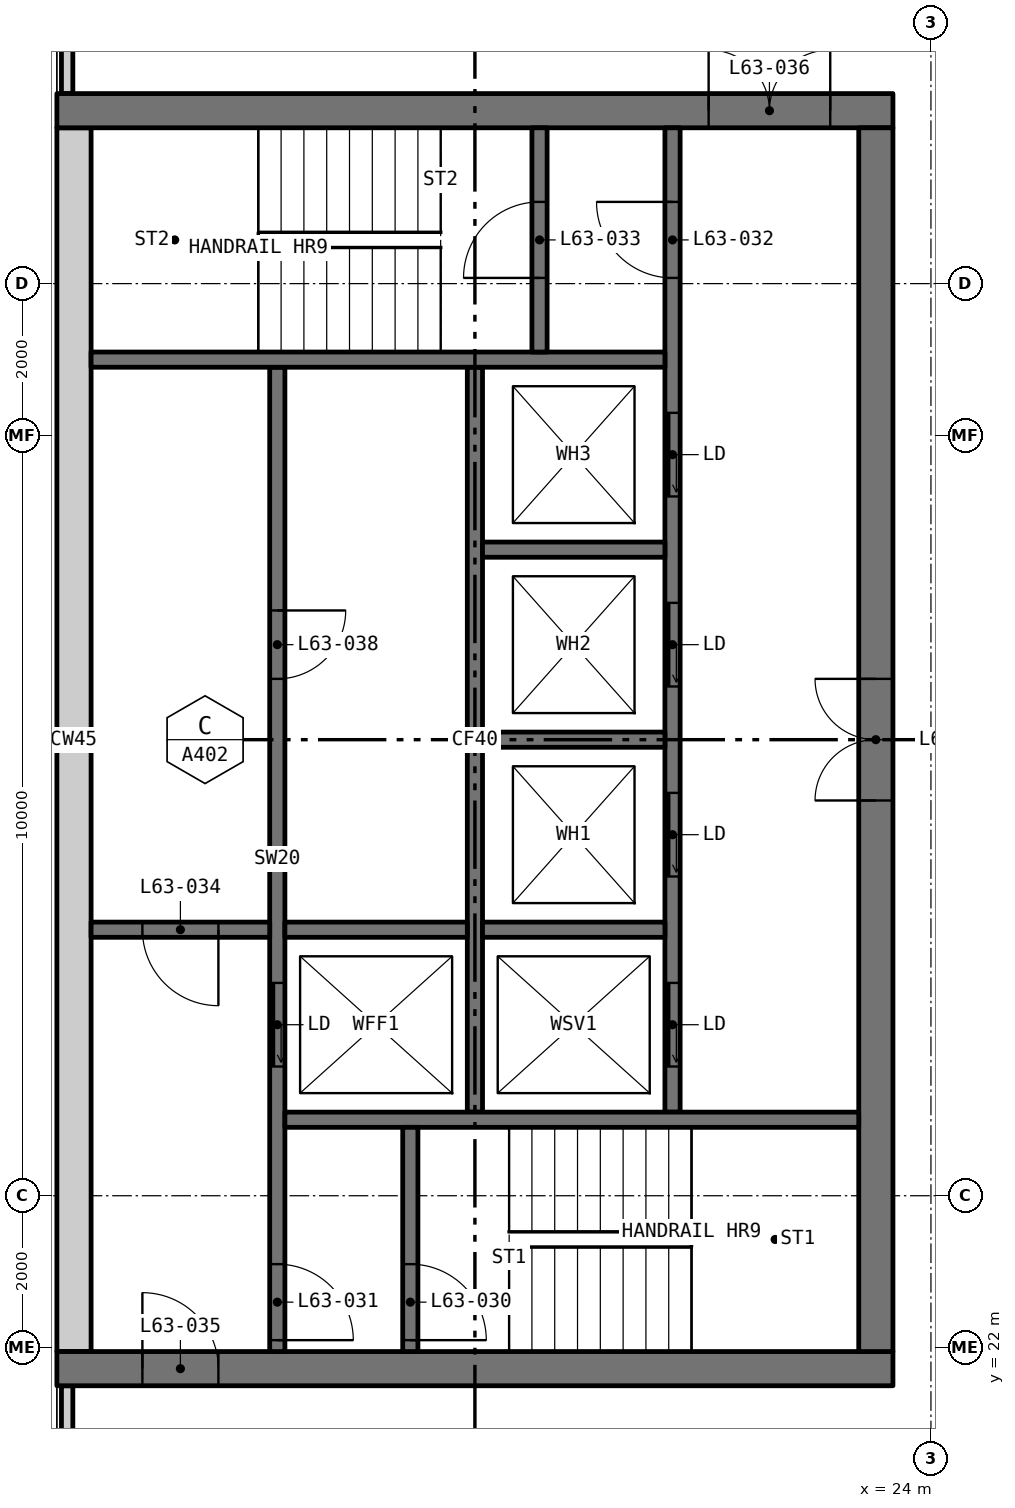
"""IFC4 building model, lengths in metres.
Left out: names, types, materials, properties, quantities, classifications, styles, units other than length and angle.
Written with IfcOpenShell. Run it as: python <this file> out.ifc"""

import sys

from ifc_helpers import new_model, si_unit, direction, frame, frame_2d, origin, place, context, subcontext, project, spatial, rectangle, extrude, element, fill, save


model = new_model("IFC4")
c1 = context("Model", 3, precision=1e-05, world=origin(), true_north=direction((0.0, 1.0)))
c2 = subcontext(c1, "Body", "Model", "MODEL_VIEW")
j1 = project(units=[si_unit("LENGTHUNIT", "METRE"), si_unit("PLANEANGLEUNIT", "RADIAN")], contexts=[c1])
p1 = place(None, origin())
s1 = spatial("IfcSite", under=j1, at=p1, CompositionType="ELEMENT")
p2 = place(p1, origin())
s2 = spatial("IfcBuilding", under=s1, at=p2, CompositionType="ELEMENT")
p3 = place(p2, frame((0.0, 0.0, 235.2)))
s3 = spatial("IfcBuildingStorey", under=s2, at=p3, CompositionType="ELEMENT", Elevation=235.2)
for number, where, z_axis, x_axis in (
    (1, (12.635, 18.71, 0.0), (0.0, 0.0, 1.0), (0.0, 1.0, 0.0)),
    (2, (12.635, 38.5, 0.0), (0.0, 0.0, 1.0), (0.0, 1.0, 0.0)),
):
    element("IfcWall", number, at=place(p3, frame(where, z_axis=z_axis, x_axis=x_axis)), inside=s3, PredefinedType="ELEMENTEDWALL", context=c2, shape_type="SweptSolid", body=[
        extrude(rectangle(XDim=2.79, YDim=0.15, at=frame_2d((1.395, 0.0))), origin(), (0.0, 0.0, 1.0), 3.05),
    ])
p4 = place(p3, frame((12.5, 21.725, 0.0), z_axis=(0.0, 0.0, 1.0), x_axis=(1.0, 0.0, 0.0)))
e3 = element("IfcWall", 3, at=p4, inside=s3, PredefinedType="SHEAR", context=c2, shape_type="SweptSolid", body=[
    extrude(rectangle(XDim=11.0, YDim=0.45, at=frame_2d((5.5, 0.0))), origin(), (0.0, 0.0, 1.0), 3.05),
])
p5 = place(p4, frame((1.125, 0.0, 0.0)))
e4 = element("IfcOpeningElement", 4, at=p5, cuts=e3, PredefinedType="OPENING", context=c2, shape_type="SweptSolid", body=[
    extrude(rectangle(XDim=1.0, YDim=2.1, at=frame_2d((0.5, 1.05))), frame((0.0, 0.235, 0.0), z_axis=(0.0, -1.0, 0.0), x_axis=(1.0, 0.0, 0.0)), (0.0, 0.0, 1.0), 0.47),
])
p6 = place(p3, frame((12.5, 38.275, 0.0), z_axis=(0.0, 0.0, 1.0), x_axis=(1.0, 0.0, 0.0)))
e5 = element("IfcWall", 5, at=p6, inside=s3, PredefinedType="SHEAR", context=c2, shape_type="SweptSolid", body=[
    extrude(rectangle(XDim=11.0, YDim=0.45, at=frame_2d((5.5, 0.0))), origin(), (0.0, 0.0, 1.0), 3.05),
])
p7 = place(p6, frame((8.575, 0.0, 0.0)))
e6 = element("IfcOpeningElement", 6, at=p7, cuts=e5, PredefinedType="OPENING", context=c2, shape_type="SweptSolid", body=[
    extrude(rectangle(XDim=1.6, YDim=2.1, at=frame_2d((0.8, 1.05))), frame((0.0, 0.235, 0.0), z_axis=(0.0, -1.0, 0.0), x_axis=(1.0, 0.0, 0.0)), (0.0, 0.0, 1.0), 0.47),
])
p8 = place(p3, frame((12.725, 21.95, 0.0), z_axis=(0.0, 0.0, 1.0), x_axis=(0.0, 1.0, 0.0)))
e7 = element("IfcWall", 7, at=p8, inside=s3, PredefinedType="SHEAR", context=c2, shape_type="SweptSolid", body=[
    extrude(rectangle(XDim=16.1, YDim=0.45, at=frame_2d((8.05, 0.0))), origin(), (0.0, 0.0, 1.0), 3.05),
])
p9 = place(p3, frame((23.275, 21.95, 0.0), z_axis=(0.0, 0.0, 1.0), x_axis=(0.0, 1.0, 0.0)))
e8 = element("IfcWall", 8, at=p9, inside=s3, PredefinedType="SHEAR", context=c2, shape_type="SweptSolid", body=[
    extrude(rectangle(XDim=16.1, YDim=0.45, at=frame_2d((8.05, 0.0))), origin(), (0.0, 0.0, 1.0), 3.05),
])
p10 = place(p9, frame((7.25, 0.0, 0.0)))
e9 = element("IfcOpeningElement", 9, at=p10, cuts=e8, PredefinedType="OPENING", context=c2, shape_type="SweptSolid", body=[
    extrude(rectangle(XDim=1.6, YDim=2.1, at=frame_2d((0.8, 1.05))), frame((0.0, 0.235, 0.0), z_axis=(0.0, -1.0, 0.0), x_axis=(1.0, 0.0, 0.0)), (0.0, 0.0, 1.0), 0.47),
])
p11 = place(p3, frame((15.4, 21.95, 0.0), z_axis=(0.0, 0.0, 1.0), x_axis=(0.0, 1.0, 0.0)))
e10 = element("IfcWall", 10, at=p11, inside=s3, PredefinedType="SOLIDWALL", context=c2, shape_type="SweptSolid", body=[
    extrude(rectangle(XDim=12.95, YDim=0.2, at=frame_2d((6.475, 0.0))), origin(), (0.0, 0.0, 1.0), 3.05),
])
p12 = place(p11, frame((3.75, 0.0, 0.0)))
e11 = element("IfcOpeningElement", 11, at=p12, cuts=e10, PredefinedType="OPENING", context=c2, shape_type="SweptSolid", body=[
    extrude(rectangle(XDim=1.1, YDim=2.1, at=frame_2d((0.55, 1.05))), frame((0.0, 0.11, 0.0), z_axis=(0.0, -1.0, 0.0), x_axis=(1.0, 0.0, 0.0)), (0.0, 0.0, 1.0), 0.22),
])
p13 = place(p11, frame((0.15, 0.0, 0.0)))
e12 = element("IfcOpeningElement", 12, at=p13, cuts=e10, PredefinedType="OPENING", context=c2, shape_type="SweptSolid", body=[
    extrude(rectangle(XDim=1.0, YDim=2.1, at=frame_2d((0.5, 1.05))), frame((0.0, 0.11, 0.0), z_axis=(0.0, -1.0, 0.0), x_axis=(1.0, 0.0, 0.0)), (0.0, 0.0, 1.0), 0.22),
])
p14 = place(p11, frame((8.85, 0.0, 0.0)))
e13 = element("IfcOpeningElement", 13, at=p14, cuts=e10, PredefinedType="OPENING", context=c2, shape_type="SweptSolid", body=[
    extrude(rectangle(XDim=0.9, YDim=2.1, at=frame_2d((0.45, 1.05))), frame((0.0, 0.11, 0.0), z_axis=(0.0, -1.0, 0.0), x_axis=(1.0, 0.0, 0.0)), (0.0, 0.0, 1.0), 0.22),
])
p15 = place(p3, frame((20.6, 25.1, 0.0), z_axis=(0.0, 0.0, 1.0), x_axis=(0.0, 1.0, 0.0)))
e14 = element("IfcWall", 14, at=p15, inside=s3, PredefinedType="SOLIDWALL", context=c2, shape_type="SweptSolid", body=[
    extrude(rectangle(XDim=12.95, YDim=0.2, at=frame_2d((6.475, 0.0))), origin(), (0.0, 0.0, 1.0), 3.05),
])
p16 = place(p15, frame((0.6, 0.0, 0.0)))
e15 = element("IfcOpeningElement", 15, at=p16, cuts=e14, PredefinedType="OPENING", context=c2, shape_type="SweptSolid", body=[
    extrude(rectangle(XDim=1.1, YDim=2.1, at=frame_2d((0.55, 1.05))), frame((0.0, 0.11, 0.0), z_axis=(0.0, -1.0, 0.0), x_axis=(1.0, 0.0, 0.0)), (0.0, 0.0, 1.0), 0.22),
])
p17 = place(p15, frame((3.1, 0.0, 0.0)))
e16 = element("IfcOpeningElement", 16, at=p17, cuts=e14, PredefinedType="OPENING", context=c2, shape_type="SweptSolid", body=[
    extrude(rectangle(XDim=1.1, YDim=2.1, at=frame_2d((0.55, 1.05))), frame((0.0, 0.11, 0.0), z_axis=(0.0, -1.0, 0.0), x_axis=(1.0, 0.0, 0.0)), (0.0, 0.0, 1.0), 0.22),
])
p18 = place(p15, frame((5.6, 0.0, 0.0)))
e17 = element("IfcOpeningElement", 17, at=p18, cuts=e14, PredefinedType="OPENING", context=c2, shape_type="SweptSolid", body=[
    extrude(rectangle(XDim=1.1, YDim=2.1, at=frame_2d((0.55, 1.05))), frame((0.0, 0.11, 0.0), z_axis=(0.0, -1.0, 0.0), x_axis=(1.0, 0.0, 0.0)), (0.0, 0.0, 1.0), 0.22),
])
p19 = place(p15, frame((8.1, 0.0, 0.0)))
e18 = element("IfcOpeningElement", 18, at=p19, cuts=e14, PredefinedType="OPENING", context=c2, shape_type="SweptSolid", body=[
    extrude(rectangle(XDim=1.1, YDim=2.1, at=frame_2d((0.55, 1.05))), frame((0.0, 0.11, 0.0), z_axis=(0.0, -1.0, 0.0), x_axis=(1.0, 0.0, 0.0)), (0.0, 0.0, 1.0), 0.22),
])
p20 = place(p15, frame((10.975, 0.0, 0.0)))
e19 = element("IfcOpeningElement", 19, at=p20, cuts=e14, PredefinedType="OPENING", context=c2, shape_type="SweptSolid", body=[
    extrude(rectangle(XDim=1.0, YDim=2.1, at=frame_2d((0.5, 1.05))), frame((0.0, 0.11, 0.0), z_axis=(0.0, -1.0, 0.0), x_axis=(1.0, 0.0, 0.0)), (0.0, 0.0, 1.0), 0.22),
])
p21 = place(p3, frame((18.0, 25.1, 0.0), z_axis=(0.0, 0.0, 1.0), x_axis=(0.0, 1.0, 0.0)))
e20 = element("IfcWall", 20, at=p21, inside=s3, PredefinedType="SOLIDWALL", context=c2, shape_type="SweptSolid", body=[
    extrude(rectangle(XDim=9.8, YDim=0.2, at=frame_2d((4.9, 0.0))), origin(), (0.0, 0.0, 1.0), 3.05),
])
for number, where, z_axis, x_axis in (
    (21, (15.5, 25.0, 0.0), (0.0, 0.0, 1.0), (1.0, 0.0, 0.0)),
    (22, (12.95, 35.0, 0.0), (0.0, 0.0, 1.0), (1.0, 0.0, 0.0)),
):
    element("IfcWall", number, at=place(p3, frame(where, z_axis=z_axis, x_axis=x_axis)), inside=s3, PredefinedType="SOLIDWALL", context=c2, shape_type="SweptSolid", body=[
        extrude(rectangle(XDim=7.55, YDim=0.2, at=frame_2d((3.775, 0.0))), origin(), (0.0, 0.0, 1.0), 3.05),
    ])
p22 = place(p3, frame((12.95, 27.5, 0.0), z_axis=(0.0, 0.0, 1.0), x_axis=(1.0, 0.0, 0.0)))
e23 = element("IfcWall", 23, at=p22, inside=s3, PredefinedType="SOLIDWALL", context=c2, shape_type="SweptSolid", body=[
    extrude(rectangle(XDim=2.35, YDim=0.2, at=frame_2d((1.175, 0.0))), origin(), (0.0, 0.0, 1.0), 3.05),
])
p23 = place(p22, frame((0.675, 0.0, 0.0)))
e24 = element("IfcOpeningElement", 24, at=p23, cuts=e23, PredefinedType="OPENING", context=c2, shape_type="SweptSolid", body=[
    extrude(rectangle(XDim=1.0, YDim=2.1, at=frame_2d((0.5, 1.05))), frame((0.0, 0.11, 0.0), z_axis=(0.0, -1.0, 0.0), x_axis=(1.0, 0.0, 0.0)), (0.0, 0.0, 1.0), 0.22),
])
p24 = place(p3, frame((17.15, 21.95, 0.0), z_axis=(0.0, 0.0, 1.0), x_axis=(0.0, 1.0, 0.0)))
e25 = element("IfcWall", 25, at=p24, inside=s3, PredefinedType="SOLIDWALL", context=c2, shape_type="SweptSolid", body=[
    extrude(rectangle(XDim=2.95, YDim=0.2, at=frame_2d((1.475, 0.0))), origin(), (0.0, 0.0, 1.0), 3.05),
])
p25 = place(p24, frame((0.15, 0.0, 0.0)))
e26 = element("IfcOpeningElement", 26, at=p25, cuts=e25, PredefinedType="OPENING", context=c2, shape_type="SweptSolid", body=[
    extrude(rectangle(XDim=1.0, YDim=2.1, at=frame_2d((0.5, 1.05))), frame((0.0, 0.11, 0.0), z_axis=(0.0, -1.0, 0.0), x_axis=(1.0, 0.0, 0.0)), (0.0, 0.0, 1.0), 0.22),
])
p26 = place(p3, frame((18.85, 35.1, 0.0), z_axis=(0.0, 0.0, 1.0), x_axis=(0.0, 1.0, 0.0)))
e27 = element("IfcWall", 27, at=p26, inside=s3, PredefinedType="SOLIDWALL", context=c2, shape_type="SweptSolid", body=[
    extrude(rectangle(XDim=2.95, YDim=0.2, at=frame_2d((1.475, 0.0))), origin(), (0.0, 0.0, 1.0), 3.05),
])
p27 = place(p26, frame((0.975, 0.0, 0.0)))
e28 = element("IfcOpeningElement", 28, at=p27, cuts=e27, PredefinedType="OPENING", context=c2, shape_type="SweptSolid", body=[
    extrude(rectangle(XDim=1.0, YDim=2.1, at=frame_2d((0.5, 1.05))), frame((0.0, 0.11, 0.0), z_axis=(0.0, -1.0, 0.0), x_axis=(1.0, 0.0, 0.0)), (0.0, 0.0, 1.0), 0.22),
])
for number, where, z_axis, x_axis in (
    (29, (15.5, 27.5, 0.0), (0.0, 0.0, 1.0), (1.0, 0.0, 0.0)),
    (30, (18.1, 27.5, 0.0), (0.0, 0.0, 1.0), (1.0, 0.0, 0.0)),
    (31, (18.1, 30.0, 0.0), (0.0, 0.0, 1.0), (1.0, 0.0, 0.0)),
    (32, (18.1, 32.5, 0.0), (0.0, 0.0, 1.0), (1.0, 0.0, 0.0)),
):
    element("IfcWall", number, at=place(p3, frame(where, z_axis=z_axis, x_axis=x_axis)), inside=s3, PredefinedType="SOLIDWALL", context=c2, shape_type="SweptSolid", body=[
        extrude(rectangle(XDim=2.4, YDim=0.2, at=frame_2d((1.2, 0.0))), origin(), (0.0, 0.0, 1.0), 3.05),
    ])
p28 = place(p16, origin())
e33 = element("IfcDoor", 33, at=p28, inside=s3, OperationType="SLIDING_TO_LEFT", PredefinedType="DOOR", context=c2, shape_type="SweptSolid", body=[
    extrude(rectangle(XDim=1.1, YDim=2.1, at=frame_2d((0.55, 1.05))), frame((0.0, 0.025, 0.0), z_axis=(0.0, -1.0, 0.0), x_axis=(1.0, 0.0, 0.0)), (0.0, 0.0, 1.0), 0.05),
])
fill(e15, e33)
p29 = place(p17, origin())
e34 = element("IfcDoor", 34, at=p29, inside=s3, OperationType="SLIDING_TO_LEFT", PredefinedType="DOOR", context=c2, shape_type="SweptSolid", body=[
    extrude(rectangle(XDim=1.1, YDim=2.1, at=frame_2d((0.55, 1.05))), frame((0.0, 0.025, 0.0), z_axis=(0.0, -1.0, 0.0), x_axis=(1.0, 0.0, 0.0)), (0.0, 0.0, 1.0), 0.05),
])
fill(e16, e34)
p30 = place(p18, origin())
e35 = element("IfcDoor", 35, at=p30, inside=s3, OperationType="SLIDING_TO_LEFT", PredefinedType="DOOR", context=c2, shape_type="SweptSolid", body=[
    extrude(rectangle(XDim=1.1, YDim=2.1, at=frame_2d((0.55, 1.05))), frame((0.0, 0.025, 0.0), z_axis=(0.0, -1.0, 0.0), x_axis=(1.0, 0.0, 0.0)), (0.0, 0.0, 1.0), 0.05),
])
fill(e17, e35)
p31 = place(p19, origin())
e36 = element("IfcDoor", 36, at=p31, inside=s3, OperationType="SLIDING_TO_LEFT", PredefinedType="DOOR", context=c2, shape_type="SweptSolid", body=[
    extrude(rectangle(XDim=1.1, YDim=2.1, at=frame_2d((0.55, 1.05))), frame((0.0, 0.025, 0.0), z_axis=(0.0, -1.0, 0.0), x_axis=(1.0, 0.0, 0.0)), (0.0, 0.0, 1.0), 0.05),
])
fill(e18, e36)
p32 = place(p12, origin())
e37 = element("IfcDoor", 37, at=p32, inside=s3, OperationType="SLIDING_TO_LEFT", PredefinedType="DOOR", context=c2, shape_type="SweptSolid", body=[
    extrude(rectangle(XDim=1.1, YDim=2.1, at=frame_2d((0.55, 1.05))), frame((0.0, 0.025, 0.0), z_axis=(0.0, -1.0, 0.0), x_axis=(1.0, 0.0, 0.0)), (0.0, 0.0, 1.0), 0.05),
])
fill(e11, e37)
p33 = place(p25, frame((1.0, 0.0, 0.0), x_axis=(-1.0, 0.0, 0.0)))
e38 = element("IfcDoor", 38, at=p33, inside=s3, OperationType="SINGLE_SWING_LEFT", PredefinedType="DOOR", context=c2, shape_type="SweptSolid", body=[
    extrude(rectangle(XDim=1.0, YDim=2.1, at=frame_2d((0.5, 1.05))), frame((0.0, 0.025, 0.0), z_axis=(0.0, -1.0, 0.0), x_axis=(1.0, 0.0, 0.0)), (0.0, 0.0, 1.0), 0.05),
])
fill(e26, e38)
p34 = place(p13, frame((1.0, 0.0, 0.0), x_axis=(-1.0, 0.0, 0.0)))
e39 = element("IfcDoor", 39, at=p34, inside=s3, OperationType="SINGLE_SWING_LEFT", PredefinedType="DOOR", context=c2, shape_type="SweptSolid", body=[
    extrude(rectangle(XDim=1.0, YDim=2.1, at=frame_2d((0.5, 1.05))), frame((0.0, 0.025, 0.0), z_axis=(0.0, -1.0, 0.0), x_axis=(1.0, 0.0, 0.0)), (0.0, 0.0, 1.0), 0.05),
])
fill(e12, e39)
p35 = place(p20, origin())
e40 = element("IfcDoor", 40, at=p35, inside=s3, OperationType="SINGLE_SWING_LEFT", PredefinedType="DOOR", context=c2, shape_type="SweptSolid", body=[
    extrude(rectangle(XDim=1.0, YDim=2.1, at=frame_2d((0.5, 1.05))), frame((0.0, 0.025, 0.0), z_axis=(0.0, -1.0, 0.0), x_axis=(1.0, 0.0, 0.0)), (0.0, 0.0, 1.0), 0.05),
])
fill(e19, e40)
p36 = place(p27, origin())
e41 = element("IfcDoor", 41, at=p36, inside=s3, OperationType="SINGLE_SWING_RIGHT", PredefinedType="DOOR", context=c2, shape_type="SweptSolid", body=[
    extrude(rectangle(XDim=1.0, YDim=2.1, at=frame_2d((0.5, 1.05))), frame((0.0, 0.025, 0.0), z_axis=(0.0, -1.0, 0.0), x_axis=(1.0, 0.0, 0.0)), (0.0, 0.0, 1.0), 0.05),
])
fill(e28, e41)
p37 = place(p23, frame((1.0, 0.0, 0.0), x_axis=(-1.0, 0.0, 0.0)))
e42 = element("IfcDoor", 42, at=p37, inside=s3, OperationType="SINGLE_SWING_RIGHT", PredefinedType="DOOR", context=c2, shape_type="SweptSolid", body=[
    extrude(rectangle(XDim=1.0, YDim=2.1, at=frame_2d((0.5, 1.05))), frame((0.0, 0.025, 0.0), z_axis=(0.0, -1.0, 0.0), x_axis=(1.0, 0.0, 0.0)), (0.0, 0.0, 1.0), 0.05),
])
fill(e24, e42)
p38 = place(p5, origin())
e43 = element("IfcDoor", 43, at=p38, inside=s3, OperationType="SINGLE_SWING_RIGHT", PredefinedType="DOOR", context=c2, shape_type="SweptSolid", body=[
    extrude(rectangle(XDim=1.0, YDim=2.1, at=frame_2d((0.5, 1.05))), frame((0.0, 0.025, 0.0), z_axis=(0.0, -1.0, 0.0), x_axis=(1.0, 0.0, 0.0)), (0.0, 0.0, 1.0), 0.05),
])
fill(e4, e43)
p39 = place(p7, origin())
e44 = element("IfcDoor", 44, at=p39, inside=s3, OperationType="DOUBLE_DOOR_SINGLE_SWING", PredefinedType="DOOR", context=c2, shape_type="SweptSolid", body=[
    extrude(rectangle(XDim=1.6, YDim=2.1, at=frame_2d((0.8, 1.05))), frame((0.0, 0.025, 0.0), z_axis=(0.0, -1.0, 0.0), x_axis=(1.0, 0.0, 0.0)), (0.0, 0.0, 1.0), 0.05),
])
fill(e6, e44)
p40 = place(p10, origin())
e45 = element("IfcDoor", 45, at=p40, inside=s3, OperationType="DOUBLE_DOOR_SINGLE_SWING", PredefinedType="DOOR", context=c2, shape_type="SweptSolid", body=[
    extrude(rectangle(XDim=1.6, YDim=2.1, at=frame_2d((0.8, 1.05))), frame((0.0, 0.025, 0.0), z_axis=(0.0, -1.0, 0.0), x_axis=(1.0, 0.0, 0.0)), (0.0, 0.0, 1.0), 0.05),
])
fill(e9, e45)
p41 = place(p14, frame((0.9, 0.0, 0.0), x_axis=(-1.0, 0.0, 0.0)))
e46 = element("IfcDoor", 46, at=p41, inside=s3, OperationType="SINGLE_SWING_RIGHT", PredefinedType="DOOR", context=c2, shape_type="SweptSolid", body=[
    extrude(rectangle(XDim=0.9, YDim=2.1, at=frame_2d((0.45, 1.05))), frame((0.0, 0.025, 0.0), z_axis=(0.0, -1.0, 0.0), x_axis=(1.0, 0.0, 0.0)), (0.0, 0.0, 1.0), 0.05),
])
fill(e13, e46)
save(model, sys.argv[1])
